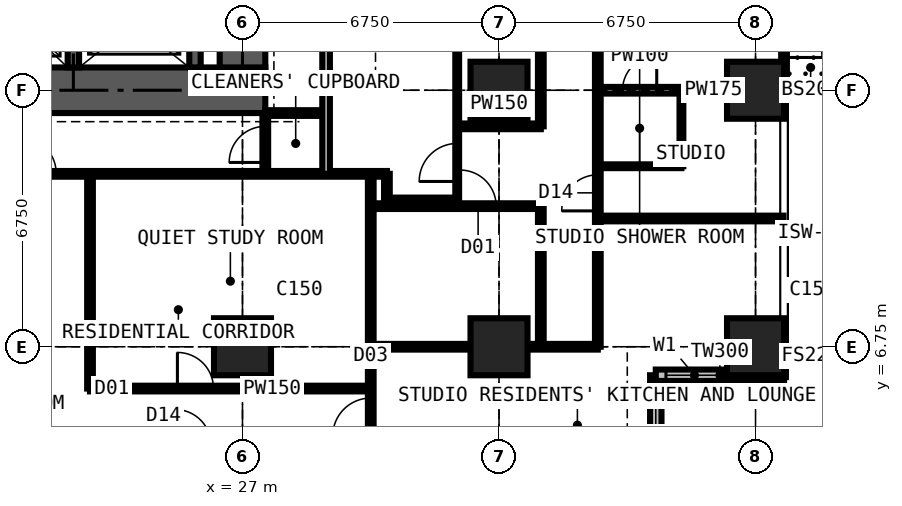
"""IFC4 building model, lengths in metres.
Left out: names, types, materials, properties, quantities, classifications, styles, units other than length and angle.
Written with IfcOpenShell. Run it as: python <this file> out.ifc"""

import sys

from ifc_helpers import new_model, si_unit, direction, frame, frame_2d, origin, origin_2d, place, context, subcontext, project, spatial, rectangle, extrude, element, fill, save


model = new_model("IFC4")
c1 = context("Model", 3, precision=1e-05, world=origin(), true_north=direction((0.0, 1.0)))
c2 = subcontext(c1, "Body", "Model", "MODEL_VIEW")
j1 = project(units=[si_unit("LENGTHUNIT", "METRE"), si_unit("PLANEANGLEUNIT", "RADIAN")], contexts=[c1])
p1 = place(None, origin())
s1 = spatial("IfcSite", under=j1, at=p1, CompositionType="ELEMENT")
p2 = place(p1, origin())
s2 = spatial("IfcBuilding", under=s1, at=p2, CompositionType="ELEMENT")
p3 = place(p2, frame((0.0, 0.0, 116.1)))
s3 = spatial("IfcBuildingStorey", under=s2, at=p3, CompositionType="ELEMENT", Elevation=116.1)
for number, where, z_axis, x_axis in (
    (1, (27.0, 6.75, 0.0), (0.0, 0.0, 1.0), (1.0, 0.0, 0.0)),
    (2, (33.75, 6.75, 0.0), (0.0, 0.0, 1.0), (1.0, 0.0, 0.0)),
    (3, (33.75, 13.5, 0.0), (0.0, 0.0, 1.0), (1.0, 0.0, 0.0)),
    (4, (40.5, 6.75, 0.0), (0.0, 0.0, 1.0), (1.0, 0.0, 0.0)),
    (5, (40.5, 13.5, 0.0), (0.0, 0.0, 1.0), (1.0, 0.0, 0.0)),
):
    element("IfcColumn", number, at=place(p3, frame(where, z_axis=z_axis, x_axis=x_axis)), inside=s3, PredefinedType="COLUMN", context=c2, shape_type="SweptSolid", body=[
        extrude(rectangle(XDim=1.5, YDim=1.5, at=origin_2d()), origin(), (0.0, 0.0, 1.0), 3.6),
    ])
p4 = place(p3, frame((12.9, 13.5, 0.0), z_axis=(0.0, 0.0, 1.0), x_axis=(1.0, 0.0, 0.0)))
e6 = element("IfcWall", 6, at=p4, inside=s3, PredefinedType="SHEAR", context=c2, shape_type="SweptSolid", body=[
    extrude(rectangle(XDim=14.7, YDim=1.2, at=frame_2d((7.35, 0.0))), origin(), (0.0, 0.0, 1.0), 3.6),
])
p5 = place(p3, frame((27.0, 14.1, 0.0), z_axis=(0.0, 0.0, 1.0), x_axis=(0.0, 1.0, 0.0)))
e7 = element("IfcWall", 7, at=p5, inside=s3, PredefinedType="SHEAR", context=c2, shape_type="SweptSolid", body=[
    extrude(rectangle(XDim=12.3, YDim=1.2, at=frame_2d((6.15, 0.0))), origin(), (0.0, 0.0, 1.0), 3.6),
])
p6 = place(p5, frame((3.65, 0.0, 0.0)))
e8 = element("IfcOpeningElement", 8, at=p6, cuts=e7, PredefinedType="OPENING", context=c2, shape_type="SweptSolid", body=[
    extrude(rectangle(XDim=1.2, YDim=2.2, at=frame_2d((0.6, 1.1))), frame((0.0, 0.61, 0.0), z_axis=(0.0, -1.0, 0.0), x_axis=(1.0, 0.0, 0.0)), (0.0, 0.0, 1.0), 1.22),
])
p7 = place(p3, frame((41.25, 20.25, 0.0), z_axis=(0.0, 0.0, 1.0), x_axis=(0.0, -1.0, 0.0)))
e9 = element("IfcWall", 9, at=p7, inside=s3, PredefinedType="SOLIDWALL", context=c2, shape_type="SweptSolid", body=[
    extrude(rectangle(XDim=6.75, YDim=0.15, at=frame_2d((3.375, 0.0))), origin(), (0.0, 0.0, 1.0), 3.375),
])
p8 = place(p7, frame((0.863, 0.0, 0.0)))
e10 = element("IfcOpeningElement", 10, at=p8, cuts=e9, PredefinedType="OPENING", context=c2, shape_type="SweptSolid", body=[
    extrude(rectangle(XDim=1.0, YDim=2.2, at=frame_2d((0.5, 1.1))), frame((0.0, 0.085, 0.0), z_axis=(0.0, -1.0, 0.0), x_axis=(1.0, 0.0, 0.0)), (0.0, 0.0, 1.0), 0.17),
])
p9 = place(p7, frame((1.975, 0.0, 0.9)))
e11 = element("IfcOpeningElement", 11, at=p9, cuts=e9, PredefinedType="OPENING", context=c2, shape_type="SweptSolid", body=[
    extrude(rectangle(XDim=1.2, YDim=1.8, at=frame_2d((0.6, 0.9))), frame((0.0, 0.085, 0.0), z_axis=(0.0, -1.0, 0.0), x_axis=(1.0, 0.0, 0.0)), (0.0, 0.0, 1.0), 0.17),
])
p10 = place(p7, frame((4.887, 0.0, 0.0)))
e12 = element("IfcOpeningElement", 12, at=p10, cuts=e9, PredefinedType="OPENING", context=c2, shape_type="SweptSolid", body=[
    extrude(rectangle(XDim=1.0, YDim=2.2, at=frame_2d((0.5, 1.1))), frame((0.0, 0.085, 0.0), z_axis=(0.0, -1.0, 0.0), x_axis=(1.0, 0.0, 0.0)), (0.0, 0.0, 1.0), 0.17),
])
p11 = place(p7, frame((3.575, 0.0, 0.9)))
e13 = element("IfcOpeningElement", 13, at=p11, cuts=e9, PredefinedType="OPENING", context=c2, shape_type="SweptSolid", body=[
    extrude(rectangle(XDim=1.2, YDim=1.8, at=frame_2d((0.6, 0.9))), frame((0.0, 0.085, 0.0), z_axis=(0.0, -1.0, 0.0), x_axis=(1.0, 0.0, 0.0)), (0.0, 0.0, 1.0), 0.17),
])
p12 = place(p3, frame((37.875, 2.625, 0.0), z_axis=(0.0, 0.0, 1.0), x_axis=(0.0, 1.0, 0.0)))
e14 = element("IfcWall", 14, at=p12, inside=s3, PredefinedType="SOLIDWALL", context=c2, shape_type="SweptSolid", body=[
    extrude(rectangle(XDim=3.375, YDim=0.3, at=frame_2d((1.688, 0.0))), origin(), (0.0, 0.0, 1.0), 3.375),
])
p13 = place(p12, frame((0.788, 0.0, 0.6)))
e15 = element("IfcOpeningElement", 15, at=p13, cuts=e14, PredefinedType="OPENING", context=c2, shape_type="SweptSolid", body=[
    extrude(rectangle(XDim=1.8, YDim=2.1, at=frame_2d((0.9, 1.05))), frame((0.0, 0.16, 0.0), z_axis=(0.0, -1.0, 0.0), x_axis=(1.0, 0.0, 0.0)), (0.0, 0.0, 1.0), 0.32),
])
p14 = place(p3, frame((37.875, 6.0, 0.0), z_axis=(0.0, 0.0, 1.0), x_axis=(1.0, 0.0, 0.0)))
e16 = element("IfcWall", 16, at=p14, inside=s3, PredefinedType="SOLIDWALL", context=c2, shape_type="SweptSolid", body=[
    extrude(rectangle(XDim=3.375, YDim=0.3, at=frame_2d((1.688, 0.0))), origin(), (0.0, 0.0, 1.0), 3.375),
])
p15 = place(p14, frame((0.268, 0.0, 0.9)))
e17 = element("IfcOpeningElement", 17, at=p15, cuts=e16, PredefinedType="OPENING", context=c2, shape_type="SweptSolid", body=[
    extrude(rectangle(XDim=1.5, YDim=1.8, at=frame_2d((0.75, 0.9))), frame((0.0, 0.16, 0.0), z_axis=(0.0, -1.0, 0.0), x_axis=(1.0, 0.0, 0.0)), (0.0, 0.0, 1.0), 0.32),
])
for number, where, z_axis, x_axis in (
    (18, (22.55, 14.1, 0.0), (0.0, 0.0, 1.0), (0.0, 1.0, 0.0)),
    (19, (25.75, 14.1, 0.0), (0.0, 0.0, 1.0), (0.0, 1.0, 0.0)),
):
    element("IfcWall", number, at=place(p3, frame(where, z_axis=z_axis, x_axis=x_axis)), inside=s3, PredefinedType="SHEAR", context=c2, shape_type="SweptSolid", body=[
        extrude(rectangle(XDim=2.3, YDim=0.3, at=frame_2d((1.15, 0.0))), origin(), (0.0, 0.0, 1.0), 3.6),
    ])
p16 = place(p3, frame((10.125, 11.3, 0.0), z_axis=(0.0, 0.0, 1.0), x_axis=(1.0, 0.0, 0.0)))
e20 = element("IfcWall", 20, at=p16, inside=s3, PredefinedType="PARTITIONING", context=c2, shape_type="SweptSolid", body=[
    extrude(rectangle(XDim=20.675, YDim=0.15, at=frame_2d((10.337, 0.0))), origin(), (0.0, 0.0, 1.0), 3.375),
])
p17 = place(p16, frame((8.375, 0.0, 0.0)))
e21 = element("IfcOpeningElement", 21, at=p17, cuts=e20, PredefinedType="OPENING", context=c2, shape_type="SweptSolid", body=[
    extrude(rectangle(XDim=1.0, YDim=2.2, at=frame_2d((0.5, 1.1))), frame((0.0, 0.085, 0.0), z_axis=(0.0, -1.0, 0.0), x_axis=(1.0, 0.0, 0.0)), (0.0, 0.0, 1.0), 0.17),
])
p18 = place(p16, frame((10.975, 0.0, 0.0)))
e22 = element("IfcOpeningElement", 22, at=p18, cuts=e20, PredefinedType="OPENING", context=c2, shape_type="SweptSolid", body=[
    extrude(rectangle(XDim=1.0, YDim=2.2, at=frame_2d((0.5, 1.1))), frame((0.0, 0.085, 0.0), z_axis=(0.0, -1.0, 0.0), x_axis=(1.0, 0.0, 0.0)), (0.0, 0.0, 1.0), 0.17),
])
p19 = place(p16, frame((3.925, 0.0, 0.0)))
e23 = element("IfcOpeningElement", 23, at=p19, cuts=e20, PredefinedType="OPENING", context=c2, shape_type="SweptSolid", body=[
    extrude(rectangle(XDim=0.95, YDim=2.2, at=frame_2d((0.475, 1.1))), frame((0.0, 0.085, 0.0), z_axis=(0.0, -1.0, 0.0), x_axis=(1.0, 0.0, 0.0)), (0.0, 0.0, 1.0), 0.17),
])
p20 = place(p3, frame((22.988, 5.65, 0.0), z_axis=(0.0, 0.0, 1.0), x_axis=(1.0, 0.0, 0.0)))
e24 = element("IfcWall", 24, at=p20, inside=s3, PredefinedType="PARTITIONING", context=c2, shape_type="SweptSolid", body=[
    extrude(rectangle(XDim=7.387, YDim=0.15, at=frame_2d((3.694, 0.0))), origin(), (0.0, 0.0, 1.0), 3.375),
])
p21 = place(p20, frame((2.3, 0.0, 0.0)))
e25 = element("IfcOpeningElement", 25, at=p21, cuts=e24, PredefinedType="OPENING", context=c2, shape_type="SweptSolid", body=[
    extrude(rectangle(XDim=0.95, YDim=2.2, at=frame_2d((0.475, 1.1))), frame((0.0, 0.085, 0.0), z_axis=(0.0, -1.0, 0.0), x_axis=(1.0, 0.0, 0.0)), (0.0, 0.0, 1.0), 0.17),
])
p22 = place(p3, frame((22.988, 5.65, 0.0), z_axis=(0.0, 0.0, 1.0), x_axis=(0.0, 1.0, 0.0)))
e26 = element("IfcWall", 26, at=p22, inside=s3, PredefinedType="PARTITIONING", context=c2, shape_type="SweptSolid", body=[
    extrude(rectangle(XDim=5.65, YDim=0.15, at=frame_2d((2.825, 0.0))), origin(), (0.0, 0.0, 1.0), 3.375),
])
p23 = place(p3, frame((27.6, 11.3, 0.0), z_axis=(0.0, 0.0, 1.0), x_axis=(0.0, 1.0, 0.0)))
e27 = element("IfcWall", 27, at=p23, inside=s3, PredefinedType="PARTITIONING", context=c2, shape_type="SweptSolid", body=[
    extrude(rectangle(XDim=1.6, YDim=0.15, at=frame_2d((0.8, 0.0))), origin(), (0.0, 0.0, 1.0), 3.375),
])
p24 = place(p23, frame((0.3, 0.0, 0.0)))
e28 = element("IfcOpeningElement", 28, at=p24, cuts=e27, PredefinedType="OPENING", context=c2, shape_type="SweptSolid", body=[
    extrude(rectangle(XDim=0.95, YDim=2.2, at=frame_2d((0.475, 1.1))), frame((0.0, 0.085, 0.0), z_axis=(0.0, -1.0, 0.0), x_axis=(1.0, 0.0, 0.0)), (0.0, 0.0, 1.0), 0.17),
])
p25 = place(p3, frame((27.6, 12.9, 0.0), z_axis=(0.0, 0.0, 1.0), x_axis=(1.0, 0.0, 0.0)))
e29 = element("IfcWall", 29, at=p25, inside=s3, PredefinedType="PARTITIONING", context=c2, shape_type="SweptSolid", body=[
    extrude(rectangle(XDim=1.6, YDim=0.15, at=frame_2d((0.8, 0.0))), origin(), (0.0, 0.0, 1.0), 2.806),
])
p26 = place(p3, frame((29.2, 11.3, 0.0), z_axis=(0.0, 0.0, 1.0), x_axis=(0.0, 1.0, 0.0)))
e30 = element("IfcWall", 30, at=p26, inside=s3, PredefinedType="PARTITIONING", context=c2, shape_type="SweptSolid", body=[
    extrude(rectangle(XDim=17.9, YDim=0.2, at=frame_2d((8.95, 0.0))), origin(), (0.0, 0.0, 1.0), 3.375),
])
p27 = place(p26, frame((8.35, 0.0, 0.0)))
e31 = element("IfcOpeningElement", 31, at=p27, cuts=e30, PredefinedType="OPENING", context=c2, shape_type="SweptSolid", body=[
    extrude(rectangle(XDim=1.2, YDim=2.2, at=frame_2d((0.6, 1.1))), frame((0.0, 0.11, 0.0), z_axis=(0.0, -1.0, 0.0), x_axis=(1.0, 0.0, 0.0)), (0.0, 0.0, 1.0), 0.22),
])
p28 = place(p3, frame((30.375, -0.734, 0.0), z_axis=(0.0, 0.0, 1.0), x_axis=(0.0, 1.0, 0.0)))
e32 = element("IfcWall", 32, at=p28, inside=s3, PredefinedType="PARTITIONING", context=c2, shape_type="SweptSolid", body=[
    extrude(rectangle(XDim=12.034, YDim=0.15, at=frame_2d((6.017, 0.0))), origin(), (0.0, 0.0, 1.0), 3.375),
])
p29 = place(p28, frame((5.134, 0.0, 0.0)))
e33 = element("IfcOpeningElement", 33, at=p29, cuts=e32, PredefinedType="OPENING", context=c2, shape_type="SweptSolid", body=[
    extrude(rectangle(XDim=1.0, YDim=2.2, at=frame_2d((0.5, 1.1))), frame((0.0, 0.085, 0.0), z_axis=(0.0, -1.0, 0.0), x_axis=(1.0, 0.0, 0.0)), (0.0, 0.0, 1.0), 0.17),
])
p30 = place(p3, frame((30.375, 6.75, 0.0), z_axis=(0.0, 0.0, 1.0), x_axis=(1.0, 0.0, 0.0)))
e34 = element("IfcWall", 34, at=p30, inside=s3, PredefinedType="PARTITIONING", context=c2, shape_type="SweptSolid", body=[
    extrude(rectangle(XDim=5.975, YDim=0.15, at=frame_2d((2.988, 0.0))), origin(), (0.0, 0.0, 1.0), 2.877),
])
p31 = place(p3, frame((30.375, 10.45, 0.0), z_axis=(0.0, 0.0, 1.0), x_axis=(1.0, 0.0, 0.0)))
e35 = element("IfcWall", 35, at=p31, inside=s3, PredefinedType="PARTITIONING", context=c2, shape_type="SweptSolid", body=[
    extrude(rectangle(XDim=4.475, YDim=0.15, at=frame_2d((2.238, 0.0))), origin(), (0.0, 0.0, 1.0), 3.375),
])
p32 = place(p31, frame((2.35, 0.0, 0.0)))
e36 = element("IfcOpeningElement", 36, at=p32, cuts=e35, PredefinedType="OPENING", context=c2, shape_type="SweptSolid", body=[
    extrude(rectangle(XDim=0.95, YDim=2.2, at=frame_2d((0.475, 1.1))), frame((0.0, 0.085, 0.0), z_axis=(0.0, -1.0, 0.0), x_axis=(1.0, 0.0, 0.0)), (0.0, 0.0, 1.0), 0.17),
])
p33 = place(p3, frame((30.8, 10.6, 0.0), z_axis=(0.0, 0.0, 1.0), x_axis=(0.0, 1.0, 0.0)))
e37 = element("IfcWall", 37, at=p33, inside=s3, PredefinedType="PARTITIONING", context=c2, shape_type="SweptSolid", body=[
    extrude(rectangle(XDim=0.7, YDim=0.15, at=frame_2d((0.35, 0.0))), origin(), (0.0, 0.0, 1.0), 3.375),
])
p34 = place(p3, frame((30.8, 10.6, 0.0), z_axis=(0.0, 0.0, 1.0), x_axis=(1.0, 0.0, 0.0)))
e38 = element("IfcWall", 38, at=p34, inside=s3, PredefinedType="PARTITIONING", context=c2, shape_type="SweptSolid", body=[
    extrude(rectangle(XDim=1.85, YDim=0.15, at=frame_2d((0.925, 0.0))), origin(), (0.0, 0.0, 1.0), 3.375),
])
p35 = place(p3, frame((32.65, 10.6, 0.0), z_axis=(0.0, 0.0, 1.0), x_axis=(0.0, 1.0, 0.0)))
e39 = element("IfcWall", 39, at=p35, inside=s3, PredefinedType="SHEAR", context=c2, shape_type="SweptSolid", body=[
    extrude(rectangle(XDim=9.3, YDim=0.1, at=frame_2d((4.65, 0.0))), origin(), (0.0, 0.0, 1.0), 3.375),
])
p36 = place(p35, frame((0.5, 0.0, 0.0)))
e40 = element("IfcOpeningElement", 40, at=p36, cuts=e39, PredefinedType="OPENING", context=c2, shape_type="SweptSolid", body=[
    extrude(rectangle(XDim=1.0, YDim=2.2, at=frame_2d((0.5, 1.1))), frame((0.0, 0.06, 0.0), z_axis=(0.0, -1.0, 0.0), x_axis=(1.0, 0.0, 0.0)), (0.0, 0.0, 1.0), 0.12),
])
p37 = place(p3, frame((32.65, 12.55, 0.0), z_axis=(0.0, 0.0, 1.0), x_axis=(1.0, 0.0, 0.0)))
e41 = element("IfcWall", 41, at=p37, inside=s3, PredefinedType="PARTITIONING", context=c2, shape_type="SweptSolid", body=[
    extrude(rectangle(XDim=2.2, YDim=0.15, at=frame_2d((1.1, 0.0))), origin(), (0.0, 0.0, 1.0), 3.375),
])
p38 = place(p3, frame((34.85, 6.75, 0.0), z_axis=(0.0, 0.0, 1.0), x_axis=(0.0, 1.0, 0.0)))
e42 = element("IfcWall", 42, at=p38, inside=s3, PredefinedType="PARTITIONING", context=c2, shape_type="SweptSolid", body=[
    extrude(rectangle(XDim=3.7, YDim=0.15, at=frame_2d((1.85, 0.0))), origin(), (0.0, 0.0, 1.0), 3.375),
])
p39 = place(p3, frame((34.85, 12.55, 0.0), z_axis=(0.0, 0.0, 1.0), x_axis=(0.0, 1.0, 0.0)))
e43 = element("IfcWall", 43, at=p39, inside=s3, PredefinedType="PARTITIONING", context=c2, shape_type="SweptSolid", body=[
    extrude(rectangle(XDim=17.825, YDim=0.15, at=frame_2d((8.913, 0.0))), origin(), (0.0, 0.0, 1.0), 3.375),
])
p40 = place(p39, frame((8.5, 0.0, 0.0)))
e44 = element("IfcOpeningElement", 44, at=p40, cuts=e43, PredefinedType="OPENING", context=c2, shape_type="SweptSolid", body=[
    extrude(rectangle(XDim=0.95, YDim=2.2, at=frame_2d((0.475, 1.1))), frame((0.0, 0.085, 0.0), z_axis=(0.0, -1.0, 0.0), x_axis=(1.0, 0.0, 0.0)), (0.0, 0.0, 1.0), 0.17),
])
p41 = place(p3, frame((36.35, 6.75, 0.0), z_axis=(0.0, 0.0, 1.0), x_axis=(0.0, 1.0, 0.0)))
e45 = element("IfcWall", 45, at=p41, inside=s3, PredefinedType="PARTITIONING", context=c2, shape_type="SweptSolid", body=[
    extrude(rectangle(XDim=20.25, YDim=0.15, at=frame_2d((10.125, 0.0))), origin(), (0.0, 0.0, 1.0), 3.375),
])
p42 = place(p41, frame((15.1, 0.0, 0.0)))
e46 = element("IfcOpeningElement", 46, at=p42, cuts=e45, PredefinedType="OPENING", context=c2, shape_type="SweptSolid", body=[
    extrude(rectangle(XDim=0.95, YDim=2.2, at=frame_2d((0.475, 1.1))), frame((0.0, 0.085, 0.0), z_axis=(0.0, -1.0, 0.0), x_axis=(1.0, 0.0, 0.0)), (0.0, 0.0, 1.0), 0.17),
])
p43 = place(p41, frame((8.35, 0.0, 0.0)))
e47 = element("IfcOpeningElement", 47, at=p43, cuts=e45, PredefinedType="OPENING", context=c2, shape_type="SweptSolid", body=[
    extrude(rectangle(XDim=0.95, YDim=2.2, at=frame_2d((0.475, 1.1))), frame((0.0, 0.085, 0.0), z_axis=(0.0, -1.0, 0.0), x_axis=(1.0, 0.0, 0.0)), (0.0, 0.0, 1.0), 0.17),
])
p44 = place(p41, frame((3.575, 0.0, 0.0)))
e48 = element("IfcOpeningElement", 48, at=p44, cuts=e45, PredefinedType="OPENING", context=c2, shape_type="SweptSolid", body=[
    extrude(rectangle(XDim=0.95, YDim=2.2, at=frame_2d((0.475, 1.1))), frame((0.0, 0.085, 0.0), z_axis=(0.0, -1.0, 0.0), x_axis=(1.0, 0.0, 0.0)), (0.0, 0.0, 1.0), 0.17),
])
p45 = place(p3, frame((36.35, 10.125, 0.0), z_axis=(0.0, 0.0, 1.0), x_axis=(1.0, 0.0, 0.0)))
e49 = element("IfcWall", 49, at=p45, inside=s3, PredefinedType="PARTITIONING", context=c2, shape_type="SweptSolid", body=[
    extrude(rectangle(XDim=4.884, YDim=0.15, at=frame_2d((2.442, 0.0))), origin(), (0.0, 0.0, 1.0), 3.375),
])
p46 = place(p3, frame((36.35, 11.5, 0.0), z_axis=(0.0, 0.0, 1.0), x_axis=(1.0, 0.0, 0.0)))
e50 = element("IfcWall", 50, at=p46, inside=s3, PredefinedType="PARTITIONING", context=c2, shape_type="SweptSolid", body=[
    extrude(rectangle(XDim=2.2, YDim=0.1, at=frame_2d((1.1, 0.0))), origin(), (0.0, 0.0, 1.0), 3.375),
])
p47 = place(p3, frame((36.35, 13.5, 0.0), z_axis=(0.0, 0.0, 1.0), x_axis=(1.0, 0.0, 0.0)))
e51 = element("IfcWall", 51, at=p47, inside=s3, PredefinedType="PARTITIONING", context=c2, shape_type="SweptSolid", body=[
    extrude(rectangle(XDim=4.884, YDim=0.175, at=frame_2d((2.442, 0.0))), origin(), (0.0, 0.0, 1.0), 2.877),
])
p48 = place(p47, frame((0.65, 0.0, 0.0)))
e52 = element("IfcOpeningElement", 52, at=p48, cuts=e51, PredefinedType="OPENING", context=c2, shape_type="SweptSolid", body=[
    extrude(rectangle(XDim=0.9, YDim=2.2, at=frame_2d((0.45, 1.1))), frame((0.0, 0.097, 0.0), z_axis=(0.0, -1.0, 0.0), x_axis=(1.0, 0.0, 0.0)), (0.0, 0.0, 1.0), 0.195),
])
p49 = place(p3, frame((38.55, 11.5, 0.0), z_axis=(0.0, 0.0, 1.0), x_axis=(0.0, 1.0, 0.0)))
e53 = element("IfcWall", 53, at=p49, inside=s3, PredefinedType="PARTITIONING", context=c2, shape_type="SweptSolid", body=[
    extrude(rectangle(XDim=2.0, YDim=0.1, at=frame_2d((1.0, 0.0))), origin(), (0.0, 0.0, 1.0), 3.375),
])
p50 = place(p10, origin())
e54 = element("IfcDoor", 54, at=p50, inside=s3, OperationType="SINGLE_SWING_RIGHT", PredefinedType="DOOR", context=c2, shape_type="SweptSolid", body=[
    extrude(rectangle(XDim=1.0, YDim=2.2, at=frame_2d((0.5, 1.1))), frame((0.0, 0.025, 0.0), z_axis=(0.0, -1.0, 0.0), x_axis=(1.0, 0.0, 0.0)), (0.0, 0.0, 1.0), 0.05),
])
fill(e12, e54)
p51 = place(p13, origin())
e55 = element("IfcWindow", 55, at=p51, inside=s3, PartitioningType="SINGLE_PANEL", PredefinedType="WINDOW", context=c2, shape_type="SweptSolid", body=[
    extrude(rectangle(XDim=1.8, YDim=2.1, at=frame_2d((0.9, 1.05))), frame((0.0, 0.03, 0.0), z_axis=(0.0, -1.0, 0.0), x_axis=(1.0, 0.0, 0.0)), (0.0, 0.0, 1.0), 0.06),
])
fill(e15, e55)
p52 = place(p15, origin())
e56 = element("IfcWindow", 56, at=p52, inside=s3, PartitioningType="SINGLE_PANEL", PredefinedType="WINDOW", context=c2, shape_type="SweptSolid", body=[
    extrude(rectangle(XDim=1.5, YDim=1.8, at=frame_2d((0.75, 0.9))), frame((0.0, 0.03, 0.0), z_axis=(0.0, -1.0, 0.0), x_axis=(1.0, 0.0, 0.0)), (0.0, 0.0, 1.0), 0.06),
])
fill(e17, e56)
p53 = place(p24, origin())
e57 = element("IfcDoor", 57, at=p53, inside=s3, OperationType="SINGLE_SWING_LEFT", PredefinedType="DOOR", context=c2, shape_type="SweptSolid", body=[
    extrude(rectangle(XDim=0.95, YDim=2.2, at=frame_2d((0.475, 1.1))), frame((0.0, 0.025, 0.0), z_axis=(0.0, -1.0, 0.0), x_axis=(1.0, 0.0, 0.0)), (0.0, 0.0, 1.0), 0.05),
])
fill(e28, e57)
p54 = place(p18, origin())
e58 = element("IfcDoor", 58, at=p54, inside=s3, OperationType="SINGLE_SWING_LEFT", PredefinedType="DOOR", context=c2, shape_type="SweptSolid", body=[
    extrude(rectangle(XDim=1.0, YDim=2.2, at=frame_2d((0.5, 1.1))), frame((0.0, 0.025, 0.0), z_axis=(0.0, -1.0, 0.0), x_axis=(1.0, 0.0, 0.0)), (0.0, 0.0, 1.0), 0.05),
])
fill(e22, e58)
p55 = place(p21, origin())
e59 = element("IfcDoor", 59, at=p55, inside=s3, OperationType="SINGLE_SWING_LEFT", PredefinedType="DOOR", context=c2, shape_type="SweptSolid", body=[
    extrude(rectangle(XDim=0.95, YDim=2.2, at=frame_2d((0.475, 1.1))), frame((0.0, 0.025, 0.0), z_axis=(0.0, -1.0, 0.0), x_axis=(1.0, 0.0, 0.0)), (0.0, 0.0, 1.0), 0.05),
])
fill(e25, e59)
p56 = place(p29, origin())
e60 = element("IfcDoor", 60, at=p56, inside=s3, OperationType="SINGLE_SWING_LEFT", PredefinedType="DOOR", context=c2, shape_type="SweptSolid", body=[
    extrude(rectangle(XDim=1.0, YDim=2.2, at=frame_2d((0.5, 1.1))), frame((0.0, 0.025, 0.0), z_axis=(0.0, -1.0, 0.0), x_axis=(1.0, 0.0, 0.0)), (0.0, 0.0, 1.0), 0.05),
])
fill(e33, e60)
p57 = place(p44, origin())
e61 = element("IfcDoor", 61, at=p57, inside=s3, OperationType="SINGLE_SWING_LEFT", PredefinedType="DOOR", context=c2, shape_type="SweptSolid", body=[
    extrude(rectangle(XDim=0.95, YDim=2.2, at=frame_2d((0.475, 1.1))), frame((0.0, 0.025, 0.0), z_axis=(0.0, -1.0, 0.0), x_axis=(1.0, 0.0, 0.0)), (0.0, 0.0, 1.0), 0.05),
])
fill(e48, e61)
p58 = place(p48, origin())
e62 = element("IfcDoor", 62, at=p58, inside=s3, OperationType="SINGLE_SWING_RIGHT", PredefinedType="DOOR", context=c2, shape_type="SweptSolid", body=[
    extrude(rectangle(XDim=0.9, YDim=2.2, at=frame_2d((0.45, 1.1))), frame((0.0, 0.025, 0.0), z_axis=(0.0, -1.0, 0.0), x_axis=(1.0, 0.0, 0.0)), (0.0, 0.0, 1.0), 0.05),
])
fill(e52, e62)
p59 = place(p36, origin())
e63 = element("IfcDoor", 63, at=p59, inside=s3, OperationType="SINGLE_SWING_LEFT", PredefinedType="DOOR", context=c2, shape_type="SweptSolid", body=[
    extrude(rectangle(XDim=1.0, YDim=2.2, at=frame_2d((0.5, 1.1))), frame((0.0, 0.025, 0.0), z_axis=(0.0, -1.0, 0.0), x_axis=(1.0, 0.0, 0.0)), (0.0, 0.0, 1.0), 0.05),
])
fill(e40, e63)
p60 = place(p32, origin())
e64 = element("IfcDoor", 64, at=p60, inside=s3, OperationType="SINGLE_SWING_LEFT", PredefinedType="DOOR", context=c2, shape_type="SweptSolid", body=[
    extrude(rectangle(XDim=0.95, YDim=2.2, at=frame_2d((0.475, 1.1))), frame((0.0, 0.025, 0.0), z_axis=(0.0, -1.0, 0.0), x_axis=(1.0, 0.0, 0.0)), (0.0, 0.0, 1.0), 0.05),
])
fill(e36, e64)
save(model, sys.argv[1])
